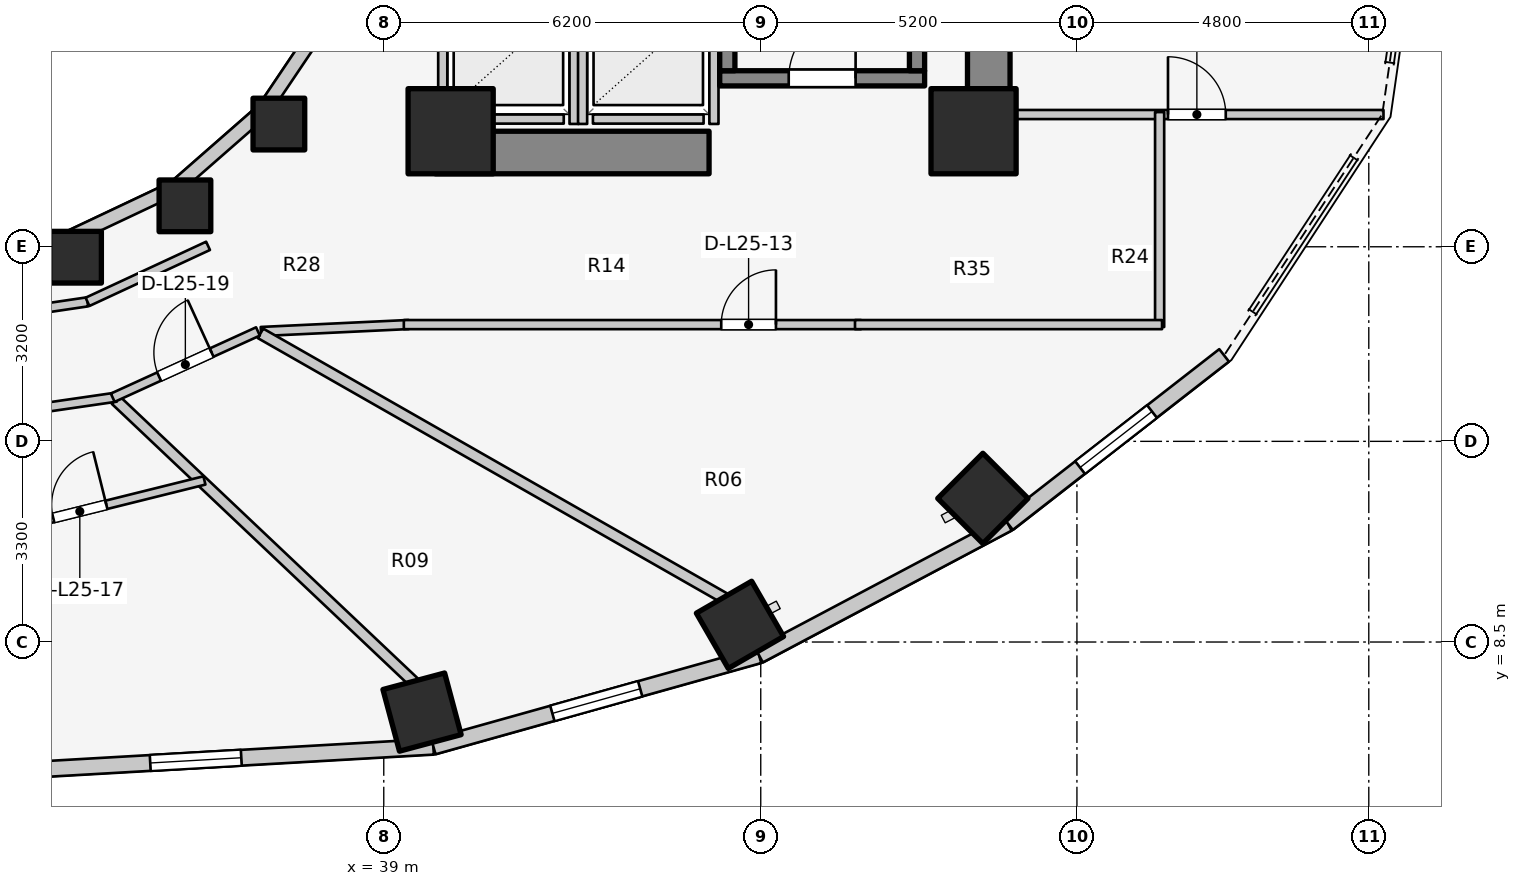
"""IFC4 building model, lengths in metres.
Left out: names, types, materials, properties, quantities, classifications, styles, units other than length and angle.
Written with IfcOpenShell. Run it as: python <this file> out.ifc"""

import sys

from ifc_helpers import new_model, si_unit, direction, frame, frame_2d, origin, origin_2d, place, context, subcontext, project, spatial, rectangle, extrude, element, fill, save


model = new_model("IFC4")
c1 = context("Model", 3, precision=1e-05, world=origin(), true_north=direction((0.0, 1.0)))
c2 = subcontext(c1, "Body", "Model", "MODEL_VIEW")
j1 = project(units=[si_unit("LENGTHUNIT", "METRE"), si_unit("PLANEANGLEUNIT", "RADIAN")], contexts=[c1])
p1 = place(None, origin())
s1 = spatial("IfcSite", under=j1, at=p1, CompositionType="ELEMENT")
p2 = place(p1, origin())
s2 = spatial("IfcBuilding", under=s1, at=p2, CompositionType="ELEMENT")
p3 = place(p2, frame((0.0, 0.0, 85.6)))
s3 = spatial("IfcBuildingStorey", under=s2, at=p3, CompositionType="ELEMENT", Elevation=85.6)
p4 = place(p3, frame((48.95, 17.05, 0.0), z_axis=(0.0, 0.0, 1.0), x_axis=(0.0, 1.0, 0.0)))
e1 = element("IfcWall", 1, at=p4, inside=s3, PredefinedType="SHEAR", context=c2, shape_type="SweptSolid", body=[
    extrude(rectangle(XDim=12.8, YDim=0.7, at=frame_2d((6.4, 0.0))), origin(), (0.0, 0.0, 1.0), 3.1),
])
p5 = place(p3, frame((39.85, 16.55, 0.0), z_axis=(0.0, 0.0, 1.0), x_axis=(1.0, 0.0, 0.0)))
e2 = element("IfcWall", 2, at=p5, inside=s3, PredefinedType="SHEAR", context=c2, shape_type="SweptSolid", body=[
    extrude(rectangle(XDim=4.5, YDim=0.7, at=frame_2d((2.25, 0.0))), origin(), (0.0, 0.0, 1.0), 3.1),
])
p6 = place(p3, frame((44.525, 17.77, 0.0), z_axis=(0.0, 0.0, 1.0), x_axis=(1.0, 0.0, 0.0)))
e3 = element("IfcWall", 3, at=p6, inside=s3, PredefinedType="SOLIDWALL", context=c2, shape_type="SweptSolid", body=[
    extrude(rectangle(XDim=3.37, YDim=0.25, at=frame_2d((1.685, 0.0))), origin(), (0.0, 0.0, 1.0), 3.1),
])
p7 = place(p6, frame((1.135, 0.0, 0.0)))
e4 = element("IfcOpeningElement", 4, at=p7, cuts=e3, PredefinedType="OPENING", context=c2, shape_type="SweptSolid", body=[
    extrude(rectangle(XDim=1.1, YDim=2.1, at=frame_2d((0.55, 1.05))), frame((0.0, 0.135, 0.0), z_axis=(0.0, -1.0, 0.0), x_axis=(1.0, 0.0, 0.0)), (0.0, 0.0, 1.0), 0.27),
])
for number, where, z_axis, x_axis in (
    (5, (44.65, 17.895, 0.0), (0.0, 0.0, 1.0), (0.0, 1.0, 0.0)),
    (6, (47.77, 17.895, 0.0), (0.0, 0.0, 1.0), (0.0, 1.0, 0.0)),
):
    element("IfcWall", number, at=place(p3, frame(where, z_axis=z_axis, x_axis=x_axis)), inside=s3, PredefinedType="SOLIDWALL", context=c2, shape_type="SweptSolid", body=[
        extrude(rectangle(XDim=7.81, YDim=0.25, at=frame_2d((3.905, 0.0))), origin(), (0.0, 0.0, 1.0), 3.1),
    ])
for number, where, z_axis, x_axis in (
    (7, (40.1, 16.9, 0.0), (0.0, 0.0, 1.0), (1.0, 0.0, 0.0)),
    (8, (48.7, 16.9, 0.0), (0.0, 0.0, 1.0), (1.0, 0.0, 0.0)),
):
    element("IfcColumn", number, at=place(p3, frame(where, z_axis=z_axis, x_axis=x_axis)), inside=s3, PredefinedType="COLUMN", context=c2, shape_type="SweptSolid", body=[
        extrude(rectangle(XDim=1.4, YDim=1.4, at=origin_2d()), origin(), (0.0, 0.0, 1.0), 3.1),
    ])
p8 = place(p3, frame((33.931, 14.828, 0.0), z_axis=(0.0, 0.0, 1.0), x_axis=(1.0, 0.0, 0.0)))
e9 = element("IfcColumn", 9, at=p8, inside=s3, PredefinedType="COLUMN", context=c2, shape_type="SweptSolid", body=[
    extrude(rectangle(XDim=0.85, YDim=0.85, at=origin_2d()), origin(), (0.0, 0.0, 1.0), 3.1),
])
p9 = place(p3, frame((39.629, 7.348, 0.0), z_axis=(0.0, 0.0, 1.0), x_axis=(0.258819045103, -0.965925826289, 0.0)))
e10 = element("IfcColumn", 10, at=p9, inside=s3, PredefinedType="COLUMN", context=c2, shape_type="SweptSolid", body=[
    extrude(rectangle(XDim=1.05, YDim=1.05, at=origin_2d()), origin(), (0.0, 0.0, 1.0), 3.1),
])
p10 = place(p3, frame((35.73, 15.673, 0.0), z_axis=(0.0, 0.0, 1.0), x_axis=(1.0, 0.0, 0.0)))
e11 = element("IfcColumn", 11, at=p10, inside=s3, PredefinedType="COLUMN", context=c2, shape_type="SweptSolid", body=[
    extrude(rectangle(XDim=0.85, YDim=0.85, at=origin_2d()), origin(), (0.0, 0.0, 1.0), 3.1),
])
p11 = place(p3, frame((44.858, 8.782, 0.0), z_axis=(0.0, 0.0, 1.0), x_axis=(0.5, -0.866025403784, 0.0)))
e12 = element("IfcColumn", 12, at=p11, inside=s3, PredefinedType="COLUMN", context=c2, shape_type="SweptSolid", body=[
    extrude(rectangle(XDim=1.05, YDim=1.05, at=origin_2d()), origin(), (0.0, 0.0, 1.0), 3.1),
])
p12 = place(p3, frame((37.275, 17.018, 0.0), z_axis=(0.0, 0.0, 1.0), x_axis=(1.0, 0.0, 0.0)))
e13 = element("IfcColumn", 13, at=p12, inside=s3, PredefinedType="COLUMN", context=c2, shape_type="SweptSolid", body=[
    extrude(rectangle(XDim=0.85, YDim=0.85, at=origin_2d()), origin(), (0.0, 0.0, 1.0), 3.1),
])
p13 = place(p3, frame((48.853, 10.862, 0.0), z_axis=(0.0, 0.0, 1.0), x_axis=(0.707106781187, -0.707106781187, 0.0)))
e14 = element("IfcColumn", 14, at=p13, inside=s3, PredefinedType="COLUMN", context=c2, shape_type="SweptSolid", body=[
    extrude(rectangle(XDim=1.05, YDim=1.05, at=origin_2d()), origin(), (0.0, 0.0, 1.0), 3.1),
])
p14 = place(p3, frame((32.0, 14.88, 0.0), z_axis=(0.0, 0.0, 1.0), x_axis=(0.988901730308, 0.148571086668, 0.0)))
e15 = element("IfcWall", 15, at=p14, inside=s3, PredefinedType="STANDARD", context=c2, shape_type="SweptSolid", body=[
    extrude(rectangle(XDim=1.864, YDim=0.23, at=frame_2d((0.932, 0.0))), origin(), (0.0, 0.0, 1.0), 2.16),
])
p15 = place(p3, frame((33.843, 15.157, 0.0), z_axis=(0.0, 0.0, 1.0), x_axis=(0.904179699603, 0.427152280606, 0.0)))
e16 = element("IfcWall", 16, at=p15, inside=s3, PredefinedType="STANDARD", context=c2, shape_type="SweptSolid", body=[
    extrude(rectangle(XDim=1.899, YDim=0.23, at=frame_2d((0.95, 0.0))), origin(), (0.0, 0.0, 1.0), 2.16),
])
p16 = place(p3, frame((35.56, 15.968, 0.0), z_axis=(0.0, 0.0, 1.0), x_axis=(0.752576694707, 0.658504607869, 0.0)))
e17 = element("IfcWall", 17, at=p16, inside=s3, PredefinedType="STANDARD", context=c2, shape_type="SweptSolid", body=[
    extrude(rectangle(XDim=1.959, YDim=0.23, at=frame_2d((0.98, 0.0))), origin(), (0.0, 0.0, 1.0), 2.16),
])
p17 = place(p3, frame((37.035, 17.258, 0.0), z_axis=(0.0, 0.0, 1.0), x_axis=(0.558197800898, 0.829707909492, 0.0)))
e18 = element("IfcWall", 18, at=p17, inside=s3, PredefinedType="STANDARD", context=c2, shape_type="SweptSolid", body=[
    extrude(rectangle(XDim=2.027, YDim=0.23, at=frame_2d((1.013, 0.0))), origin(), (0.0, 0.0, 1.0), 2.16),
])
p18 = place(p3, frame((32.0, 6.329, 0.0), z_axis=(0.0, 0.0, 1.0), x_axis=(0.998352606703, 0.057376586592, 0.0)))
e19 = element("IfcWall", 19, at=p18, inside=s3, PredefinedType="STANDARD", context=c2, shape_type="SweptSolid", body=[
    extrude(rectangle(XDim=7.829, YDim=0.26, at=frame_2d((3.915, 0.0))), origin(), (0.0, 0.0, 1.0), 2.85),
])
p19 = place(p18, frame((3.165, 0.0, 0.75)))
e20 = element("IfcOpeningElement", 20, at=p19, cuts=e19, PredefinedType="OPENING", context=c2, shape_type="SweptSolid", body=[
    extrude(rectangle(XDim=1.5, YDim=1.6, at=frame_2d((0.75, 0.8))), frame((0.0, 0.14, 0.0), z_axis=(0.0, -1.0, 0.0), x_axis=(1.0, 0.0, 0.0)), (0.0, 0.0, 1.0), 0.28),
])
p20 = place(p3, frame((39.816, 6.778, 0.0), z_axis=(0.0, 0.0, 1.0), x_axis=(0.962938491413, 0.269721081407, 0.0)))
e21 = element("IfcWall", 21, at=p20, inside=s3, PredefinedType="STANDARD", context=c2, shape_type="SweptSolid", body=[
    extrude(rectangle(XDim=5.563, YDim=0.26, at=frame_2d((2.782, 0.0))), origin(), (0.0, 0.0, 1.0), 2.85),
])
p21 = place(p20, frame((2.031, 0.0, 0.75)))
e22 = element("IfcOpeningElement", 22, at=p21, cuts=e21, PredefinedType="OPENING", context=c2, shape_type="SweptSolid", body=[
    extrude(rectangle(XDim=1.5, YDim=1.6, at=frame_2d((0.75, 0.8))), frame((0.0, 0.14, 0.0), z_axis=(0.0, -1.0, 0.0), x_axis=(1.0, 0.0, 0.0)), (0.0, 0.0, 1.0), 0.28),
])
p22 = place(p3, frame((45.173, 8.279, 0.0), z_axis=(0.0, 0.0, 1.0), x_axis=(0.883668636807, 0.4681129568, 0.0)))
e23 = element("IfcWall", 23, at=p22, inside=s3, PredefinedType="STANDARD", context=c2, shape_type="SweptSolid", body=[
    extrude(rectangle(XDim=4.631, YDim=0.26, at=frame_2d((2.316, 0.0))), origin(), (0.0, 0.0, 1.0), 2.85),
])
p23 = place(p3, frame((49.266, 10.447, 0.0), z_axis=(0.0, 0.0, 1.0), x_axis=(0.789127449954, 0.614229491094, 0.0)))
e24 = element("IfcWall", 24, at=p23, inside=s3, PredefinedType="STANDARD", context=c2, shape_type="SweptSolid", body=[
    extrude(rectangle(XDim=4.505, YDim=0.26, at=frame_2d((2.252, 0.0))), origin(), (0.0, 0.0, 1.0), 2.85),
])
p24 = place(p23, frame((1.502, 0.0, 0.75)))
e25 = element("IfcOpeningElement", 25, at=p24, cuts=e24, PredefinedType="OPENING", context=c2, shape_type="SweptSolid", body=[
    extrude(rectangle(XDim=1.5, YDim=1.6, at=frame_2d((0.75, 0.8))), frame((0.0, 0.14, 0.0), z_axis=(0.0, -1.0, 0.0), x_axis=(1.0, 0.0, 0.0)), (0.0, 0.0, 1.0), 0.28),
])
p25 = place(p3, frame((40.14, 17.1, 0.0), z_axis=(0.0, 0.0, 1.0), x_axis=(1.0, 0.0, 0.0)))
e26 = element("IfcWall", 26, at=p25, inside=s3, PredefinedType="SOLIDWALL", context=c2, shape_type="SweptSolid", body=[
    extrude(rectangle(XDim=1.82, YDim=0.15, at=frame_2d((0.91, 0.0))), origin(), (0.0, 0.0, 1.0), 2.12),
])
p26 = place(p3, frame((39.97, 17.02, 0.0), z_axis=(0.0, 0.0, 1.0), x_axis=(0.0, 1.0, 0.0)))
e27 = element("IfcWall", 27, at=p26, inside=s3, PredefinedType="SOLIDWALL", context=c2, shape_type="SweptSolid", body=[
    extrude(rectangle(XDim=2.22, YDim=0.15, at=frame_2d((1.11, 0.0))), origin(), (0.0, 0.0, 1.0), 2.12),
])
p27 = place(p3, frame((42.13, 17.02, 0.0), z_axis=(0.0, 0.0, 1.0), x_axis=(0.0, 1.0, 0.0)))
e28 = element("IfcWall", 28, at=p27, inside=s3, PredefinedType="SOLIDWALL", context=c2, shape_type="SweptSolid", body=[
    extrude(rectangle(XDim=2.22, YDim=0.15, at=frame_2d((1.11, 0.0))), origin(), (0.0, 0.0, 1.0), 2.855),
])
p28 = place(p3, frame((42.44, 17.1, 0.0), z_axis=(0.0, 0.0, 1.0), x_axis=(1.0, 0.0, 0.0)))
e29 = element("IfcWall", 29, at=p28, inside=s3, PredefinedType="SOLIDWALL", context=c2, shape_type="SweptSolid", body=[
    extrude(rectangle(XDim=1.82, YDim=0.15, at=frame_2d((0.91, 0.0))), origin(), (0.0, 0.0, 1.0), 2.855),
])
p29 = place(p3, frame((42.27, 17.02, 0.0), z_axis=(0.0, 0.0, 1.0), x_axis=(0.0, 1.0, 0.0)))
e30 = element("IfcWall", 30, at=p29, inside=s3, PredefinedType="SOLIDWALL", context=c2, shape_type="SweptSolid", body=[
    extrude(rectangle(XDim=2.22, YDim=0.15, at=frame_2d((1.11, 0.0))), origin(), (0.0, 0.0, 1.0), 2.855),
])
p30 = place(p3, frame((44.43, 17.02, 0.0), z_axis=(0.0, 0.0, 1.0), x_axis=(0.0, 1.0, 0.0)))
e31 = element("IfcWall", 31, at=p30, inside=s3, PredefinedType="SOLIDWALL", context=c2, shape_type="SweptSolid", body=[
    extrude(rectangle(XDim=2.22, YDim=0.15, at=frame_2d((1.11, 0.0))), origin(), (0.0, 0.0, 1.0), 2.12),
])
p31 = place(p3, frame((32.0, 13.78, 0.0), z_axis=(0.0, 0.0, 1.0), x_axis=(0.989268584896, 0.146108408166, 0.0)))
e32 = element("IfcWall", 32, at=p31, inside=s3, PredefinedType="PARTITIONING", context=c2, shape_type="SweptSolid", body=[
    extrude(rectangle(XDim=2.151, YDim=0.15, at=frame_2d((1.075, 0.0))), origin(), (0.0, 0.0, 1.0), 2.272),
])
p32 = place(p3, frame((34.127, 14.094, 0.0), z_axis=(0.0, 0.0, 1.0), x_axis=(0.906943449489, 0.421252393975, 0.0)))
e33 = element("IfcWall", 33, at=p32, inside=s3, PredefinedType="PARTITIONING", context=c2, shape_type="SweptSolid", body=[
    extrude(rectangle(XDim=2.186, YDim=0.15, at=frame_2d((1.093, 0.0))), origin(), (0.0, 0.0, 1.0), 2.272),
])
p33 = place(p3, frame((48.95, 17.175, 0.0), z_axis=(0.0, 0.0, 1.0), x_axis=(1.0, 0.0, 0.0)))
e34 = element("IfcWall", 34, at=p33, inside=s3, PredefinedType="PARTITIONING", context=c2, shape_type="SweptSolid", body=[
    extrude(rectangle(XDim=6.492, YDim=0.15, at=frame_2d((3.246, 0.0))), origin(), (0.0, 0.0, 1.0), 2.855),
])
p34 = place(p33, frame((2.948, 0.0, 0.0)))
e35 = element("IfcOpeningElement", 35, at=p34, cuts=e34, PredefinedType="OPENING", context=c2, shape_type="SweptSolid", body=[
    extrude(rectangle(XDim=0.95, YDim=2.1, at=frame_2d((0.475, 1.05))), frame((0.0, 0.085, 0.0), z_axis=(0.0, -1.0, 0.0), x_axis=(1.0, 0.0, 0.0)), (0.0, 0.0, 1.0), 0.17),
])
p35 = place(p3, frame((51.76, 13.68, 0.0), z_axis=(0.0, 0.0, 1.0), x_axis=(0.0, 1.0, 0.0)))
e36 = element("IfcWall", 36, at=p35, inside=s3, PredefinedType="PARTITIONING", context=c2, shape_type="SweptSolid", body=[
    extrude(rectangle(XDim=3.535, YDim=0.15, at=frame_2d((1.768, 0.0))), origin(), (0.0, 0.0, 1.0), 2.855),
])
p36 = place(p3, frame((36.98, 13.606, 0.0), z_axis=(0.0, 0.0, 1.0), x_axis=(0.998877427952, 0.047369651964, 0.0)))
e37 = element("IfcWall", 37, at=p36, inside=s3, PredefinedType="PARTITIONING", context=c2, shape_type="SweptSolid", body=[
    extrude(rectangle(XDim=2.433, YDim=0.15, at=frame_2d((1.216, 0.0))), origin(), (0.0, 0.0, 1.0), 2.272),
])
p37 = place(p3, frame((39.33, 13.72, 0.0), z_axis=(0.0, 0.0, 1.0), x_axis=(1.0, 0.0, 0.0)))
e38 = element("IfcWall", 38, at=p37, inside=s3, PredefinedType="PARTITIONING", context=c2, shape_type="SweptSolid", body=[
    extrude(rectangle(XDim=7.52, YDim=0.15, at=frame_2d((3.76, 0.0))), origin(), (0.0, 0.0, 1.0), 2.272),
])
p38 = place(p37, frame((5.22, 0.0, 0.0)))
e39 = element("IfcOpeningElement", 39, at=p38, cuts=e38, PredefinedType="OPENING", context=c2, shape_type="SweptSolid", body=[
    extrude(rectangle(XDim=0.9, YDim=2.1, at=frame_2d((0.45, 1.05))), frame((0.0, 0.085, 0.0), z_axis=(0.0, -1.0, 0.0), x_axis=(1.0, 0.0, 0.0)), (0.0, 0.0, 1.0), 0.17),
])
p39 = place(p3, frame((46.75, 13.72, 0.0), z_axis=(0.0, 0.0, 1.0), x_axis=(1.0, 0.0, 0.0)))
e40 = element("IfcWall", 40, at=p39, inside=s3, PredefinedType="PARTITIONING", context=c2, shape_type="SweptSolid", body=[
    extrude(rectangle(XDim=5.05, YDim=0.15, at=frame_2d((2.525, 0.0))), origin(), (0.0, 0.0, 1.0), 2.142),
])
p40 = place(p3, frame((34.589, 12.482, 0.0), z_axis=(0.0, 0.0, 1.0), x_axis=(0.726306601605, -0.687370875485, 0.0)))
e41 = element("IfcWall", 41, at=p40, inside=s3, PredefinedType="PARTITIONING", context=c2, shape_type="SweptSolid", body=[
    extrude(rectangle(XDim=6.76, YDim=0.18, at=frame_2d((3.38, 0.0))), origin(), (0.0, 0.0, 1.0), 2.272),
])
p41 = place(p3, frame((36.973, 13.576, 0.0), z_axis=(0.0, 0.0, 1.0), x_axis=(0.868484076301, -0.495717065685, 0.0)))
e42 = element("IfcWall", 42, at=p41, inside=s3, PredefinedType="PARTITIONING", context=c2, shape_type="SweptSolid", body=[
    extrude(rectangle(XDim=8.789, YDim=0.18, at=frame_2d((4.394, 0.0))), origin(), (0.0, 0.0, 1.0), 2.272),
])
p42 = place(p3, frame((31.95, 12.143, 0.0), z_axis=(0.0, 0.0, 1.0), x_axis=(0.989649898776, 0.143502884474, 0.0)))
e43 = element("IfcWall", 43, at=p42, inside=s3, PredefinedType="PARTITIONING", context=c2, shape_type="SweptSolid", body=[
    extrude(rectangle(XDim=2.676, YDim=0.15, at=frame_2d((1.338, 0.0))), origin(), (0.0, 0.0, 1.0), 2.272),
])
p43 = place(p3, frame((31.951, 10.138, 0.0), z_axis=(0.0, 0.0, 1.0), x_axis=(0.970461257599, 0.241257015439, 0.0)))
e44 = element("IfcWall", 44, at=p43, inside=s3, PredefinedType="PLUMBINGWALL", context=c2, shape_type="SweptSolid", body=[
    extrude(rectangle(XDim=4.224, YDim=0.14, at=frame_2d((2.112, 0.0))), origin(), (0.0, 0.0, 1.0), 2.272),
])
p44 = place(p43, frame((1.662, 0.0, 0.0)))
e45 = element("IfcOpeningElement", 45, at=p44, cuts=e44, PredefinedType="OPENING", context=c2, shape_type="SweptSolid", body=[
    extrude(rectangle(XDim=0.9, YDim=2.1, at=frame_2d((0.45, 1.05))), frame((0.0, 0.08, 0.0), z_axis=(0.0, -1.0, 0.0), x_axis=(1.0, 0.0, 0.0)), (0.0, 0.0, 1.0), 0.16),
])
p45 = place(p3, frame((34.543, 12.518, 0.0), z_axis=(0.0, 0.0, 1.0), x_axis=(0.909747571199, 0.415161843982, 0.0)))
e46 = element("IfcWall", 46, at=p45, inside=s3, PredefinedType="PARTITIONING", context=c2, shape_type="SweptSolid", body=[
    extrude(rectangle(XDim=2.625, YDim=0.15, at=frame_2d((1.312, 0.0))), origin(), (0.0, 0.0, 1.0), 2.272),
])
p46 = place(p45, frame((0.838, 0.0, 0.0)))
e47 = element("IfcOpeningElement", 47, at=p46, cuts=e46, PredefinedType="OPENING", context=c2, shape_type="SweptSolid", body=[
    extrude(rectangle(XDim=0.95, YDim=2.1, at=frame_2d((0.475, 1.05))), frame((0.0, 0.085, 0.0), z_axis=(0.0, -1.0, 0.0), x_axis=(1.0, 0.0, 0.0)), (0.0, 0.0, 1.0), 0.17),
])
p47 = place(p19, origin())
e48 = element("IfcWindow", 48, at=p47, inside=s3, PartitioningType="SINGLE_PANEL", PredefinedType="WINDOW", context=c2, shape_type="SweptSolid", body=[
    extrude(rectangle(XDim=1.5, YDim=1.6, at=frame_2d((0.75, 0.8))), frame((0.0, 0.03, 0.0), z_axis=(0.0, -1.0, 0.0), x_axis=(1.0, 0.0, 0.0)), (0.0, 0.0, 1.0), 0.06),
])
fill(e20, e48)
p48 = place(p21, origin())
e49 = element("IfcWindow", 49, at=p48, inside=s3, PartitioningType="SINGLE_PANEL", PredefinedType="WINDOW", context=c2, shape_type="SweptSolid", body=[
    extrude(rectangle(XDim=1.5, YDim=1.6, at=frame_2d((0.75, 0.8))), frame((0.0, 0.03, 0.0), z_axis=(0.0, -1.0, 0.0), x_axis=(1.0, 0.0, 0.0)), (0.0, 0.0, 1.0), 0.06),
])
fill(e22, e49)
p49 = place(p24, origin())
e50 = element("IfcWindow", 50, at=p49, inside=s3, PartitioningType="SINGLE_PANEL", PredefinedType="WINDOW", context=c2, shape_type="SweptSolid", body=[
    extrude(rectangle(XDim=1.5, YDim=1.6, at=frame_2d((0.75, 0.8))), frame((0.0, 0.03, 0.0), z_axis=(0.0, -1.0, 0.0), x_axis=(1.0, 0.0, 0.0)), (0.0, 0.0, 1.0), 0.06),
])
fill(e25, e50)
p50 = place(p7, origin())
e51 = element("IfcDoor", 51, at=p50, inside=s3, OperationType="SINGLE_SWING_RIGHT", PredefinedType="DOOR", context=c2, shape_type="SweptSolid", body=[
    extrude(rectangle(XDim=1.1, YDim=2.1, at=frame_2d((0.55, 1.05))), frame((0.0, 0.025, 0.0), z_axis=(0.0, -1.0, 0.0), x_axis=(1.0, 0.0, 0.0)), (0.0, 0.0, 1.0), 0.05),
])
fill(e4, e51)
p51 = place(p34, origin())
e52 = element("IfcDoor", 52, at=p51, inside=s3, OperationType="SINGLE_SWING_LEFT", PredefinedType="DOOR", context=c2, shape_type="SweptSolid", body=[
    extrude(rectangle(XDim=0.95, YDim=2.1, at=frame_2d((0.475, 1.05))), frame((0.0, 0.025, 0.0), z_axis=(0.0, -1.0, 0.0), x_axis=(1.0, 0.0, 0.0)), (0.0, 0.0, 1.0), 0.05),
])
fill(e35, e52)
p52 = place(p38, origin())
e53 = element("IfcDoor", 53, at=p52, inside=s3, OperationType="SINGLE_SWING_RIGHT", PredefinedType="DOOR", context=c2, shape_type="SweptSolid", body=[
    extrude(rectangle(XDim=0.9, YDim=2.1, at=frame_2d((0.45, 1.05))), frame((0.0, 0.025, 0.0), z_axis=(0.0, -1.0, 0.0), x_axis=(1.0, 0.0, 0.0)), (0.0, 0.0, 1.0), 0.05),
])
fill(e39, e53)
p53 = place(p44, origin())
e54 = element("IfcDoor", 54, at=p53, inside=s3, OperationType="SINGLE_SWING_RIGHT", PredefinedType="DOOR", context=c2, shape_type="SweptSolid", body=[
    extrude(rectangle(XDim=0.9, YDim=2.1, at=frame_2d((0.45, 1.05))), frame((0.0, 0.025, 0.0), z_axis=(0.0, -1.0, 0.0), x_axis=(1.0, 0.0, 0.0)), (0.0, 0.0, 1.0), 0.05),
])
fill(e45, e54)
p54 = place(p46, origin())
e55 = element("IfcDoor", 55, at=p54, inside=s3, OperationType="SINGLE_SWING_RIGHT", PredefinedType="DOOR", context=c2, shape_type="SweptSolid", body=[
    extrude(rectangle(XDim=0.95, YDim=2.1, at=frame_2d((0.475, 1.05))), frame((0.0, 0.025, 0.0), z_axis=(0.0, -1.0, 0.0), x_axis=(1.0, 0.0, 0.0)), (0.0, 0.0, 1.0), 0.05),
])
fill(e47, e55)
save(model, sys.argv[1])
